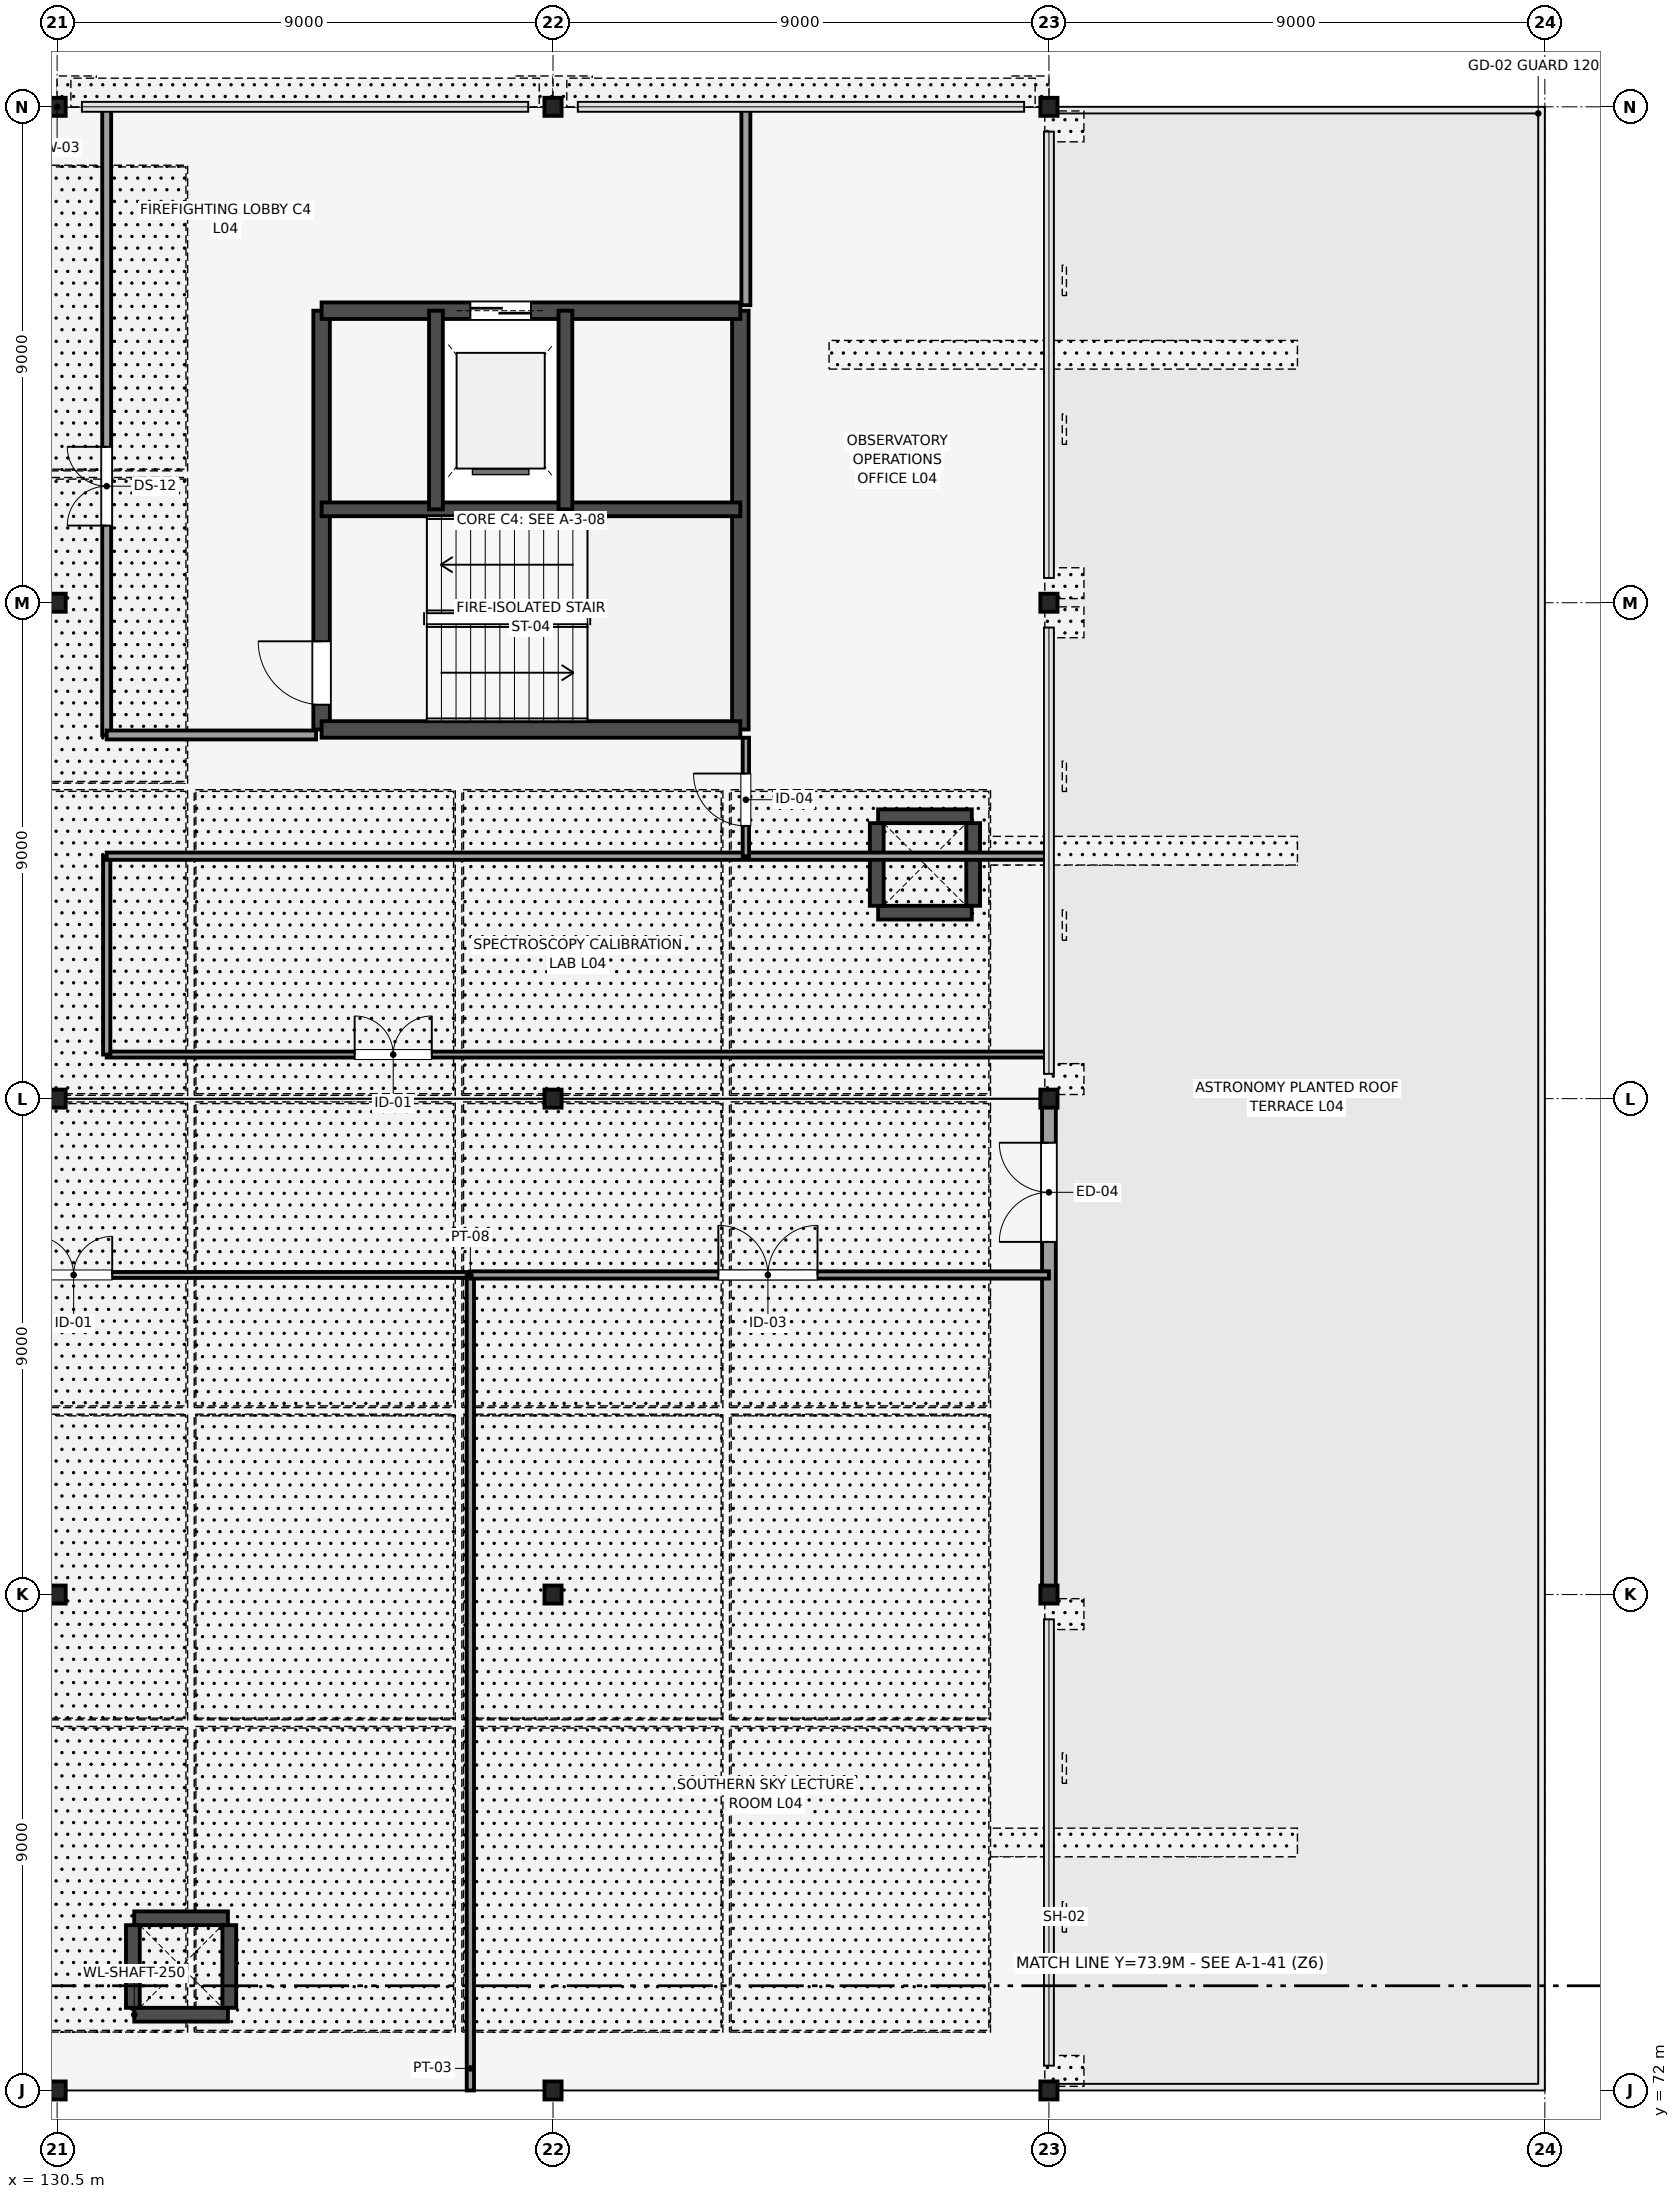
"""IFC4 building model, lengths in metres.
Left out: names, types, materials, properties, quantities, classifications, styles, units other than length and angle.
Written with IfcOpenShell. Run it as: python <this file> out.ifc"""

import sys

from ifc_helpers import new_model, si_unit, direction, frame, frame_2d, origin, origin_2d, place, context, subcontext, project, spatial, rectangle, i_section, extrude, element, fill, save


model = new_model("IFC4")
c1 = context("Model", 3, precision=1e-05, world=origin(), true_north=direction((0.0, 1.0)))
c2 = subcontext(c1, "Body", "Model", "MODEL_VIEW")
j1 = project(units=[si_unit("LENGTHUNIT", "METRE"), si_unit("PLANEANGLEUNIT", "RADIAN")], contexts=[c1])
p1 = place(None, origin())
s1 = spatial("IfcSite", under=j1, at=p1, CompositionType="ELEMENT")
p2 = place(p1, origin())
s2 = spatial("IfcBuilding", under=s1, at=p2, CompositionType="ELEMENT")
p3 = place(p2, frame((0.0, 0.0, 18.9)))
s3 = spatial("IfcBuildingStorey", under=s2, at=p3, CompositionType="ELEMENT", Elevation=18.9)
for number, where, z_axis, x_axis in (
    (1, (130.5, 72.0, 0.0), (0.0, 0.0, 1.0), (1.0, 0.0, 0.0)),
    (2, (130.5, 81.0, 0.0), (0.0, 0.0, 1.0), (1.0, 0.0, 0.0)),
    (3, (130.5, 90.0, 0.0), (0.0, 0.0, 1.0), (1.0, 0.0, 0.0)),
    (4, (130.5, 99.0, 0.0), (0.0, 0.0, 1.0), (1.0, 0.0, 0.0)),
    (5, (130.5, 108.0, 0.0), (0.0, 0.0, 1.0), (1.0, 0.0, 0.0)),
    (6, (139.5, 72.0, 0.0), (0.0, 0.0, 1.0), (1.0, 0.0, 0.0)),
    (7, (139.5, 81.0, 0.0), (0.0, 0.0, 1.0), (1.0, 0.0, 0.0)),
    (8, (139.5, 90.0, 0.0), (0.0, 0.0, 1.0), (1.0, 0.0, 0.0)),
    (9, (139.5, 108.0, 0.0), (0.0, 0.0, 1.0), (1.0, 0.0, 0.0)),
    (10, (148.5, 72.0, 0.0), (0.0, 0.0, 1.0), (1.0, 0.0, 0.0)),
    (11, (148.5, 81.0, 0.0), (0.0, 0.0, 1.0), (1.0, 0.0, 0.0)),
    (12, (148.5, 90.0, 0.0), (0.0, 0.0, 1.0), (1.0, 0.0, 0.0)),
    (13, (148.5, 99.0, 0.0), (0.0, 0.0, 1.0), (1.0, 0.0, 0.0)),
    (14, (148.5, 108.0, 0.0), (0.0, 0.0, 1.0), (1.0, 0.0, 0.0)),
):
    element("IfcColumn", number, at=place(p3, frame(where, z_axis=z_axis, x_axis=x_axis)), inside=s3, PredefinedType="COLUMN", context=c2, shape_type="SweptSolid", body=[
        extrude(i_section(OverallWidth=0.311, OverallDepth=0.327, WebThickness=0.016, FlangeThickness=0.025, FilletRadius=0.017, at=origin_2d()), origin(), (0.0, 0.0, 1.0), 4.5),
    ])
p4 = place(p3, frame((135.3, 96.7, 0.0), z_axis=(0.0, 0.0, 1.0), x_axis=(0.0, 1.0, 0.0)))
e15 = element("IfcWall", 15, at=p4, inside=s3, PredefinedType="SHEAR", context=c2, shape_type="SweptSolid", body=[
    extrude(rectangle(XDim=7.6, YDim=0.3, at=frame_2d((3.8, 0.0))), origin(), (0.0, 0.0, 1.0), 4.5),
])
p5 = place(p4, frame((0.45, 0.0, 0.0)))
e16 = element("IfcOpeningElement", 16, at=p5, cuts=e15, PredefinedType="OPENING", context=c2, shape_type="SweptSolid", body=[
    extrude(rectangle(XDim=1.15, YDim=2.15, at=frame_2d((0.575, 1.075))), frame((0.0, 0.16, 0.0), z_axis=(0.0, -1.0, 0.0), x_axis=(1.0, 0.0, 0.0)), (0.0, 0.0, 1.0), 0.32),
])
p6 = place(p3, frame((142.9, 96.7, 0.0), z_axis=(0.0, 0.0, 1.0), x_axis=(0.0, 1.0, 0.0)))
e17 = element("IfcWall", 17, at=p6, inside=s3, PredefinedType="SHEAR", context=c2, shape_type="SweptSolid", body=[
    extrude(rectangle(XDim=7.6, YDim=0.3, at=frame_2d((3.8, 0.0))), origin(), (0.0, 0.0, 1.0), 4.5),
])
p7 = place(p3, frame((135.3, 96.7, 0.0), z_axis=(0.0, 0.0, 1.0), x_axis=(1.0, 0.0, 0.0)))
e18 = element("IfcWall", 18, at=p7, inside=s3, PredefinedType="SHEAR", context=c2, shape_type="SweptSolid", body=[
    extrude(rectangle(XDim=7.6, YDim=0.3, at=frame_2d((3.8, 0.0))), origin(), (0.0, 0.0, 1.0), 4.5),
])
p8 = place(p3, frame((135.3, 104.3, 0.0), z_axis=(0.0, 0.0, 1.0), x_axis=(1.0, 0.0, 0.0)))
e19 = element("IfcWall", 19, at=p8, inside=s3, PredefinedType="SHEAR", context=c2, shape_type="SweptSolid", body=[
    extrude(rectangle(XDim=7.6, YDim=0.3, at=frame_2d((3.8, 0.0))), origin(), (0.0, 0.0, 1.0), 4.5),
])
p9 = place(p8, frame((2.7, 0.0, 0.0)))
e20 = element("IfcOpeningElement", 20, at=p9, cuts=e19, PredefinedType="OPENING", context=c2, shape_type="SweptSolid", body=[
    extrude(rectangle(XDim=1.1, YDim=2.2, at=frame_2d((0.55, 1.1))), frame((0.0, 0.16, 0.0), z_axis=(0.0, -1.0, 0.0), x_axis=(1.0, 0.0, 0.0)), (0.0, 0.0, 1.0), 0.32),
])
p10 = place(p3, frame((135.3, 100.695, 0.0), z_axis=(0.0, 0.0, 1.0), x_axis=(1.0, 0.0, 0.0)))
e21 = element("IfcWall", 21, at=p10, inside=s3, PredefinedType="SHEAR", context=c2, shape_type="SweptSolid", body=[
    extrude(rectangle(XDim=7.6, YDim=0.25, at=frame_2d((3.8, 0.0))), origin(), (0.0, 0.0, 1.0), 4.5),
])
for number, where, z_axis, x_axis in (
    (22, (137.375, 100.695, 0.0), (0.0, 0.0, 1.0), (0.0, 1.0, 0.0)),
    (23, (139.725, 100.695, 0.0), (0.0, 0.0, 1.0), (0.0, 1.0, 0.0)),
):
    element("IfcWall", number, at=place(p3, frame(where, z_axis=z_axis, x_axis=x_axis)), inside=s3, PredefinedType="SHEAR", context=c2, shape_type="SweptSolid", body=[
        extrude(rectangle(XDim=3.605, YDim=0.25, at=frame_2d((1.802, 0.0))), origin(), (0.0, 0.0, 1.0), 4.5),
    ])
for number, where, z_axis, x_axis in (
    (24, (131.9, 73.375, 0.0), (0.0, 0.0, 1.0), (1.0, 0.0, 0.0)),
    (25, (131.9, 75.125, 0.0), (0.0, 0.0, 1.0), (1.0, 0.0, 0.0)),
):
    element("IfcWall", number, at=place(p3, frame(where, z_axis=z_axis, x_axis=x_axis)), inside=s3, PredefinedType="SHEAR", context=c2, shape_type="SweptSolid", body=[
        extrude(rectangle(XDim=1.7, YDim=0.25, at=frame_2d((0.85, 0.0))), origin(), (0.0, 0.0, 1.0), 3.77),
    ])
for number, where, z_axis, x_axis in (
    (26, (131.875, 73.5, 0.0), (0.0, 0.0, 1.0), (0.0, 1.0, 0.0)),
    (27, (133.625, 73.5, 0.0), (0.0, 0.0, 1.0), (0.0, 1.0, 0.0)),
):
    element("IfcWall", number, at=place(p3, frame(where, z_axis=z_axis, x_axis=x_axis)), inside=s3, PredefinedType="SHEAR", context=c2, shape_type="SweptSolid", body=[
        extrude(rectangle(XDim=1.5, YDim=0.25, at=frame_2d((0.75, 0.0))), origin(), (0.0, 0.0, 1.0), 3.77),
    ])
for number, where, z_axis, x_axis in (
    (28, (145.4, 93.375, 0.0), (0.0, 0.0, 1.0), (1.0, 0.0, 0.0)),
    (29, (145.4, 95.125, 0.0), (0.0, 0.0, 1.0), (1.0, 0.0, 0.0)),
):
    element("IfcWall", number, at=place(p3, frame(where, z_axis=z_axis, x_axis=x_axis)), inside=s3, PredefinedType="SHEAR", context=c2, shape_type="SweptSolid", body=[
        extrude(rectangle(XDim=1.7, YDim=0.25, at=frame_2d((0.85, 0.0))), origin(), (0.0, 0.0, 1.0), 3.77),
    ])
for number, where, z_axis, x_axis in (
    (30, (145.375, 93.5, 0.0), (0.0, 0.0, 1.0), (0.0, 1.0, 0.0)),
    (31, (147.125, 93.5, 0.0), (0.0, 0.0, 1.0), (0.0, 1.0, 0.0)),
):
    element("IfcWall", number, at=place(p3, frame(where, z_axis=z_axis, x_axis=x_axis)), inside=s3, PredefinedType="SHEAR", context=c2, shape_type="SweptSolid", body=[
        extrude(rectangle(XDim=1.5, YDim=0.25, at=frame_2d((0.75, 0.0))), origin(), (0.0, 0.0, 1.0), 3.77),
    ])
p11 = place(p3, frame((130.5, 108.0, 0.0), z_axis=(0.0, 0.0, 1.0), x_axis=(-1.0, 0.0, 0.0)))
e32 = element("IfcWall", 32, at=p11, inside=s3, PredefinedType="STANDARD", context=c2, shape_type="SweptSolid", body=[
    extrude(rectangle(XDim=9.0, YDim=0.25, at=frame_2d((4.5, 0.0))), origin(), (0.0, 0.0, 1.0), 3.846),
])
p12 = place(p3, frame((148.5, 81.0, 0.0), z_axis=(0.0, 0.0, 1.0), x_axis=(0.0, 1.0, 0.0)))
e33 = element("IfcWall", 33, at=p12, inside=s3, PredefinedType="STANDARD", context=c2, shape_type="SweptSolid", body=[
    extrude(rectangle(XDim=9.0, YDim=0.25, at=frame_2d((4.5, 0.0))), origin(), (0.0, 0.0, 1.0), 3.846),
])
p13 = place(p12, frame((6.4, 0.0, 0.0)))
e34 = element("IfcOpeningElement", 34, at=p13, cuts=e33, PredefinedType="OPENING", context=c2, shape_type="SweptSolid", body=[
    extrude(rectangle(XDim=1.8, YDim=2.3, at=frame_2d((0.9, 1.15))), frame((0.0, 0.135, 0.0), z_axis=(0.0, -1.0, 0.0), x_axis=(1.0, 0.0, 0.0)), (0.0, 0.0, 1.0), 0.27),
])
p14 = place(p3, frame((131.4, 96.6, 0.0), z_axis=(0.0, 0.0, 1.0), x_axis=(0.0, 1.0, 0.0)))
e35 = element("IfcWall", 35, at=p14, inside=s3, PredefinedType="PARTITIONING", context=c2, shape_type="SweptSolid", body=[
    extrude(rectangle(XDim=11.4, YDim=0.162, at=frame_2d((5.7, 0.0))), origin(), (0.0, 0.0, 1.0), 4.32),
])
p15 = place(p14, frame((3.8, 0.0, 0.0)))
e36 = element("IfcOpeningElement", 36, at=p15, cuts=e35, PredefinedType="OPENING", context=c2, shape_type="SweptSolid", body=[
    extrude(rectangle(XDim=1.43, YDim=2.2, at=frame_2d((0.715, 1.1))), frame((0.0, 0.091, 0.0), z_axis=(0.0, -1.0, 0.0), x_axis=(1.0, 0.0, 0.0)), (0.0, 0.0, 1.0), 0.182),
])
p16 = place(p3, frame((131.4, 96.6, 0.0), z_axis=(0.0, 0.0, 1.0), x_axis=(1.0, 0.0, 0.0)))
e37 = element("IfcWall", 37, at=p16, inside=s3, PredefinedType="PARTITIONING", context=c2, shape_type="SweptSolid", body=[
    extrude(rectangle(XDim=3.8, YDim=0.162, at=frame_2d((1.9, 0.0))), origin(), (0.0, 0.0, 1.0), 4.32),
])
p17 = place(p3, frame((143.0, 104.4, 0.0), z_axis=(0.0, 0.0, 1.0), x_axis=(0.0, 1.0, 0.0)))
e38 = element("IfcWall", 38, at=p17, inside=s3, PredefinedType="PARTITIONING", context=c2, shape_type="SweptSolid", body=[
    extrude(rectangle(XDim=3.6, YDim=0.162, at=frame_2d((1.8, 0.0))), origin(), (0.0, 0.0, 1.0), 4.32),
])
p18 = place(p3, frame((124.6, 86.8, 0.0), z_axis=(0.0, 0.0, 1.0), x_axis=(1.0, 0.0, 0.0)))
e39 = element("IfcWall", 39, at=p18, inside=s3, PredefinedType="PARTITIONING", context=c2, shape_type="SweptSolid", body=[
    extrude(rectangle(XDim=13.4, YDim=0.108, at=frame_2d((6.7, 0.0))), origin(), (0.0, 0.0, 1.0), 4.32),
])
p19 = place(p18, frame((5.5, 0.0, 0.0)))
e40 = element("IfcOpeningElement", 40, at=p19, cuts=e39, PredefinedType="OPENING", context=c2, shape_type="SweptSolid", body=[
    extrude(rectangle(XDim=1.4, YDim=2.2, at=frame_2d((0.7, 1.1))), frame((0.0, 0.064, 0.0), z_axis=(0.0, -1.0, 0.0), x_axis=(1.0, 0.0, 0.0)), (0.0, 0.0, 1.0), 0.128),
])
p20 = place(p3, frame((138.0, 72.0, 0.0), z_axis=(0.0, 0.0, 1.0), x_axis=(0.0, 1.0, 0.0)))
e41 = element("IfcWall", 41, at=p20, inside=s3, PredefinedType="PARTITIONING", context=c2, shape_type="SweptSolid", body=[
    extrude(rectangle(XDim=14.8, YDim=0.132, at=frame_2d((7.4, 0.0))), origin(), (0.0, 0.0, 1.0), 4.32),
])
p21 = place(p3, frame((138.0, 86.8, 0.0), z_axis=(0.0, 0.0, 1.0), x_axis=(1.0, 0.0, 0.0)))
e42 = element("IfcWall", 42, at=p21, inside=s3, PredefinedType="PARTITIONING", context=c2, shape_type="SweptSolid", body=[
    extrude(rectangle(XDim=10.5, YDim=0.132, at=frame_2d((5.25, 0.0))), origin(), (0.0, 0.0, 1.0), 4.32),
])
p22 = place(p21, frame((4.5, 0.0, 0.0)))
e43 = element("IfcOpeningElement", 43, at=p22, cuts=e42, PredefinedType="OPENING", context=c2, shape_type="SweptSolid", body=[
    extrude(rectangle(XDim=1.8, YDim=2.3, at=frame_2d((0.9, 1.15))), frame((0.0, 0.076, 0.0), z_axis=(0.0, -1.0, 0.0), x_axis=(1.0, 0.0, 0.0)), (0.0, 0.0, 1.0), 0.152),
])
p23 = place(p3, frame((131.4, 90.8, 0.0), z_axis=(0.0, 0.0, 1.0), x_axis=(1.0, 0.0, 0.0)))
e44 = element("IfcWall", 44, at=p23, inside=s3, PredefinedType="PARTITIONING", context=c2, shape_type="SweptSolid", body=[
    extrude(rectangle(XDim=17.1, YDim=0.108, at=frame_2d((8.55, 0.0))), origin(), (0.0, 0.0, 1.0), 4.32),
])
p24 = place(p23, frame((4.5, 0.0, 0.0)))
e45 = element("IfcOpeningElement", 45, at=p24, cuts=e44, PredefinedType="OPENING", context=c2, shape_type="SweptSolid", body=[
    extrude(rectangle(XDim=1.4, YDim=2.2, at=frame_2d((0.7, 1.1))), frame((0.0, 0.064, 0.0), z_axis=(0.0, -1.0, 0.0), x_axis=(1.0, 0.0, 0.0)), (0.0, 0.0, 1.0), 0.128),
])
p25 = place(p3, frame((131.4, 90.8, 0.0), z_axis=(0.0, 0.0, 1.0), x_axis=(0.0, 1.0, 0.0)))
e46 = element("IfcWall", 46, at=p25, inside=s3, PredefinedType="PARTITIONING", context=c2, shape_type="SweptSolid", body=[
    extrude(rectangle(XDim=3.6, YDim=0.132, at=frame_2d((1.8, 0.0))), origin(), (0.0, 0.0, 1.0), 4.32),
])
p26 = place(p3, frame((131.4, 94.4, 0.0), z_axis=(0.0, 0.0, 1.0), x_axis=(1.0, 0.0, 0.0)))
e47 = element("IfcWall", 47, at=p26, inside=s3, PredefinedType="PARTITIONING", context=c2, shape_type="SweptSolid", body=[
    extrude(rectangle(XDim=17.1, YDim=0.132, at=frame_2d((8.55, 0.0))), origin(), (0.0, 0.0, 1.0), 4.32),
])
p27 = place(p3, frame((143.0, 94.4, 0.0), z_axis=(0.0, 0.0, 1.0), x_axis=(0.0, 1.0, 0.0)))
e48 = element("IfcWall", 48, at=p27, inside=s3, PredefinedType="PARTITIONING", context=c2, shape_type="SweptSolid", body=[
    extrude(rectangle(XDim=2.15, YDim=0.116, at=frame_2d((1.075, 0.0))), origin(), (0.0, 0.0, 1.0), 4.32),
])
p28 = place(p27, frame((0.55, 0.0, 0.0)))
e49 = element("IfcOpeningElement", 49, at=p28, cuts=e48, PredefinedType="OPENING", context=c2, shape_type="SweptSolid", body=[
    extrude(rectangle(XDim=0.95, YDim=2.15, at=frame_2d((0.475, 1.075))), frame((0.0, 0.068, 0.0), z_axis=(0.0, -1.0, 0.0), x_axis=(1.0, 0.0, 0.0)), (0.0, 0.0, 1.0), 0.136),
])
p29 = place(p13, origin())
e50 = element("IfcDoor", 50, at=p29, inside=s3, OperationType="DOUBLE_DOOR_SINGLE_SWING", PredefinedType="DOOR", context=c2, shape_type="SweptSolid", body=[
    extrude(rectangle(XDim=1.8, YDim=2.3, at=frame_2d((0.9, 1.15))), frame((0.0, 0.025, 0.0), z_axis=(0.0, -1.0, 0.0), x_axis=(1.0, 0.0, 0.0)), (0.0, 0.0, 1.0), 0.05),
])
fill(e34, e50)
p30 = place(p5, origin())
e51 = element("IfcDoor", 51, at=p30, inside=s3, OperationType="SINGLE_SWING_RIGHT", PredefinedType="DOOR", context=c2, shape_type="SweptSolid", body=[
    extrude(rectangle(XDim=1.15, YDim=2.15, at=frame_2d((0.575, 1.075))), frame((0.0, 0.025, 0.0), z_axis=(0.0, -1.0, 0.0), x_axis=(1.0, 0.0, 0.0)), (0.0, 0.0, 1.0), 0.05),
])
fill(e16, e51)
p31 = place(p9, origin())
e52 = element("IfcDoor", 52, at=p31, inside=s3, OperationType="DOUBLE_DOOR_SLIDING", PredefinedType="DOOR", context=c2, shape_type="SweptSolid", body=[
    extrude(rectangle(XDim=1.1, YDim=2.2, at=frame_2d((0.55, 1.1))), frame((0.0, 0.025, 0.0), z_axis=(0.0, -1.0, 0.0), x_axis=(1.0, 0.0, 0.0)), (0.0, 0.0, 1.0), 0.05),
])
fill(e20, e52)
p32 = place(p15, origin())
e53 = element("IfcDoor", 53, at=p32, inside=s3, OperationType="DOUBLE_DOOR_SINGLE_SWING", PredefinedType="DOOR", context=c2, shape_type="SweptSolid", body=[
    extrude(rectangle(XDim=1.43, YDim=2.2, at=frame_2d((0.715, 1.1))), frame((0.0, 0.025, 0.0), z_axis=(0.0, -1.0, 0.0), x_axis=(1.0, 0.0, 0.0)), (0.0, 0.0, 1.0), 0.05),
])
fill(e36, e53)
p33 = place(p19, origin())
e54 = element("IfcDoor", 54, at=p33, inside=s3, OperationType="DOUBLE_DOOR_SINGLE_SWING", PredefinedType="DOOR", context=c2, shape_type="SweptSolid", body=[
    extrude(rectangle(XDim=1.4, YDim=2.2, at=frame_2d((0.7, 1.1))), frame((0.0, 0.025, 0.0), z_axis=(0.0, -1.0, 0.0), x_axis=(1.0, 0.0, 0.0)), (0.0, 0.0, 1.0), 0.05),
])
fill(e40, e54)
p34 = place(p22, origin())
e55 = element("IfcDoor", 55, at=p34, inside=s3, OperationType="DOUBLE_DOOR_SINGLE_SWING", PredefinedType="DOOR", context=c2, shape_type="SweptSolid", body=[
    extrude(rectangle(XDim=1.8, YDim=2.3, at=frame_2d((0.9, 1.15))), frame((0.0, 0.025, 0.0), z_axis=(0.0, -1.0, 0.0), x_axis=(1.0, 0.0, 0.0)), (0.0, 0.0, 1.0), 0.05),
])
fill(e43, e55)
p35 = place(p24, origin())
e56 = element("IfcDoor", 56, at=p35, inside=s3, OperationType="DOUBLE_DOOR_SINGLE_SWING", PredefinedType="DOOR", context=c2, shape_type="SweptSolid", body=[
    extrude(rectangle(XDim=1.4, YDim=2.2, at=frame_2d((0.7, 1.1))), frame((0.0, 0.025, 0.0), z_axis=(0.0, -1.0, 0.0), x_axis=(1.0, 0.0, 0.0)), (0.0, 0.0, 1.0), 0.05),
])
fill(e45, e56)
p36 = place(p28, origin())
e57 = element("IfcDoor", 57, at=p36, inside=s3, OperationType="SINGLE_SWING_RIGHT", PredefinedType="DOOR", context=c2, shape_type="SweptSolid", body=[
    extrude(rectangle(XDim=0.95, YDim=2.15, at=frame_2d((0.475, 1.075))), frame((0.0, 0.025, 0.0), z_axis=(0.0, -1.0, 0.0), x_axis=(1.0, 0.0, 0.0)), (0.0, 0.0, 1.0), 0.05),
])
fill(e49, e57)
save(model, sys.argv[1])
